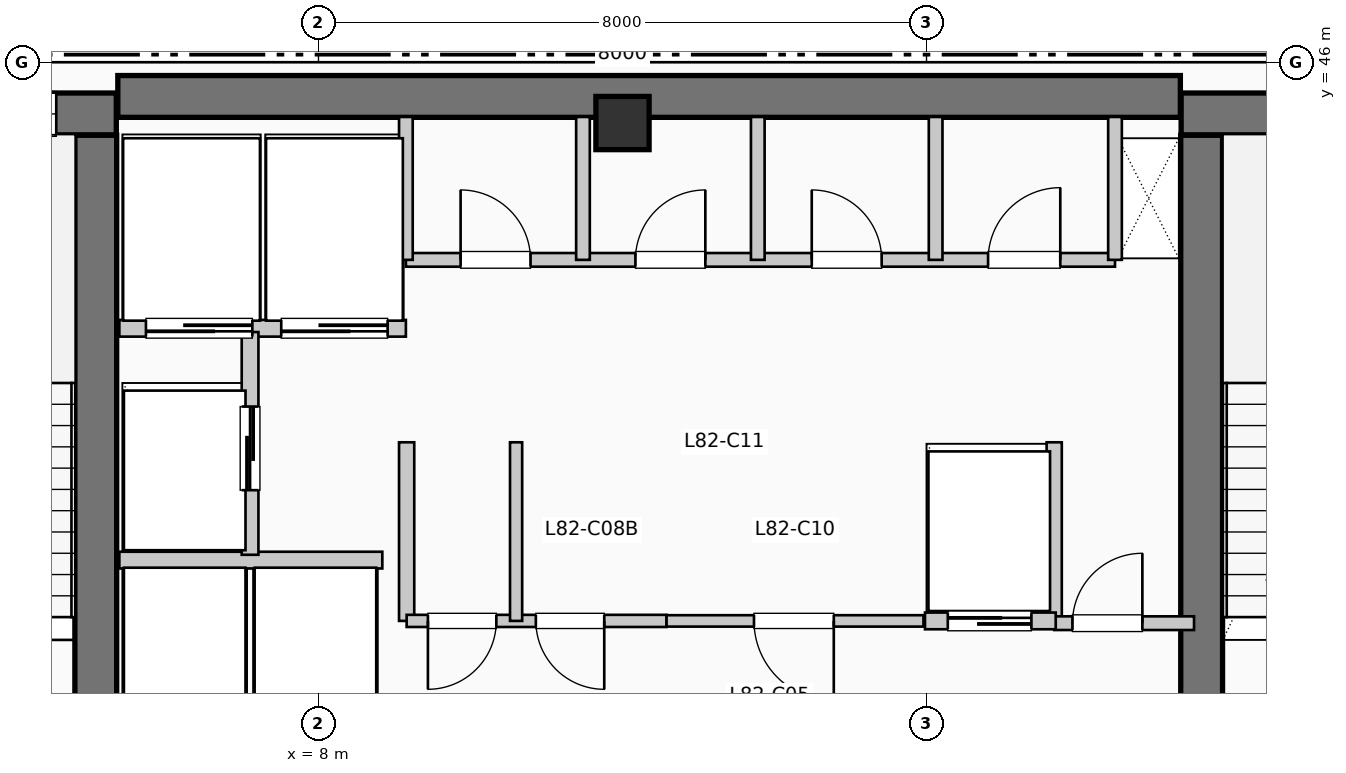
"""IFC4 building model, lengths in metres.
Left out: names, types, materials, properties, quantities, classifications, styles, units other than length and angle.
Written with IfcOpenShell. Run it as: python <this file> out.ifc"""

import sys

from ifc_helpers import new_model, si_unit, direction, frame, frame_2d, origin, origin_2d, place, context, subcontext, project, spatial, rectangle, extrude, element, fill, save


model = new_model("IFC4")
c1 = context("Model", 3, precision=1e-05, world=origin(), true_north=direction((0.0, 1.0)))
c2 = subcontext(c1, "Body", "Model", "MODEL_VIEW")
j1 = project(units=[si_unit("LENGTHUNIT", "METRE"), si_unit("PLANEANGLEUNIT", "RADIAN")], contexts=[c1])
p1 = place(None, origin())
s1 = spatial("IfcSite", under=j1, at=p1, CompositionType="ELEMENT")
p2 = place(p1, origin())
s2 = spatial("IfcBuilding", under=s1, at=p2, CompositionType="ELEMENT")
p3 = place(p2, frame((0.0, 0.0, 335.61)))
s3 = spatial("IfcBuildingStorey", under=s2, at=p3, CompositionType="ELEMENT", Elevation=335.61)
p4 = place(p3, frame((5.36, 45.55, 0.0), z_axis=(0.0, 0.0, 1.0), x_axis=(1.0, 0.0, 0.0)))
e1 = element("IfcWall", 1, at=p4, inside=s3, PredefinedType="SHEAR", context=c2, shape_type="SweptSolid", body=[
    extrude(rectangle(XDim=13.98, YDim=0.55, at=frame_2d((6.99, 0.0))), origin(), (0.0, 0.0, 1.0), 3.96),
])
p5 = place(p3, frame((5.07, 37.15, 0.0), z_axis=(0.0, 0.0, 1.0), x_axis=(0.0, 1.0, 0.0)))
e2 = element("IfcWall", 2, at=p5, inside=s3, PredefinedType="SHEAR", context=c2, shape_type="SweptSolid", body=[
    extrude(rectangle(XDim=7.89, YDim=0.55, at=frame_2d((3.945, 0.0))), origin(), (0.0, 0.0, 1.0), 3.96),
])
p6 = place(p3, frame((1.1, 45.32, 0.0), z_axis=(0.0, 0.0, 1.0), x_axis=(1.0, 0.0, 0.0)))
e3 = element("IfcWall", 3, at=p6, inside=s3, PredefinedType="SHEAR", context=c2, shape_type="SweptSolid", body=[
    extrude(rectangle(XDim=4.24, YDim=0.55, at=frame_2d((2.12, 0.0))), origin(), (0.0, 0.0, 1.0), 3.96),
])
p7 = place(p6, frame((2.05, 0.0, 1.05)))
e4 = element("IfcOpeningElement", 4, at=p7, cuts=e3, PredefinedType="OPENING", context=c2, shape_type="SweptSolid", body=[
    extrude(rectangle(XDim=1.4, YDim=1.8, at=frame_2d((0.7, 0.9))), frame((0.0, 0.285, 0.0), z_axis=(0.0, -1.0, 0.0), x_axis=(1.0, 0.0, 0.0)), (0.0, 0.0, 1.0), 0.57),
])
p8 = place(p3, frame((19.62, 37.15, 0.0), z_axis=(0.0, 0.0, 1.0), x_axis=(0.0, 1.0, 0.0)))
e5 = element("IfcWall", 5, at=p8, inside=s3, PredefinedType="SHEAR", context=c2, shape_type="SweptSolid", body=[
    extrude(rectangle(XDim=7.89, YDim=0.55, at=frame_2d((3.945, 0.0))), origin(), (0.0, 0.0, 1.0), 3.96),
])
p9 = place(p3, frame((19.35, 45.32, 0.0), z_axis=(0.0, 0.0, 1.0), x_axis=(1.0, 0.0, 0.0)))
e6 = element("IfcWall", 6, at=p9, inside=s3, PredefinedType="SHEAR", context=c2, shape_type="SweptSolid", body=[
    extrude(rectangle(XDim=3.69, YDim=0.55, at=frame_2d((1.845, 0.0))), origin(), (0.0, 0.0, 1.0), 3.96),
])
p10 = place(p9, frame((1.15, 0.0, 1.05)))
e7 = element("IfcOpeningElement", 7, at=p10, cuts=e6, PredefinedType="OPENING", context=c2, shape_type="SweptSolid", body=[
    extrude(rectangle(XDim=1.4, YDim=1.8, at=frame_2d((0.7, 0.9))), frame((0.0, 0.285, 0.0), z_axis=(0.0, -1.0, 0.0), x_axis=(1.0, 0.0, 0.0)), (0.0, 0.0, 1.0), 0.57),
])
p11 = place(p3, frame((12.0, 45.2, 0.0), z_axis=(0.0, 0.0, 1.0), x_axis=(1.0, 0.0, 0.0)))
e8 = element("IfcColumn", 8, at=p11, inside=s3, PredefinedType="COLUMN", context=c2, shape_type="SweptSolid", body=[
    extrude(rectangle(XDim=0.7, YDim=0.7, at=origin_2d()), origin(), (0.0, 0.0, 1.0), 3.96),
])
p12 = place(p3, frame((5.38, 39.45, 0.0), z_axis=(0.0, 0.0, 1.0), x_axis=(1.0, 0.0, 0.0)))
e9 = element("IfcWall", 9, at=p12, inside=s3, PredefinedType="PARTITIONING", context=c2, shape_type="SweptSolid", body=[
    extrude(rectangle(XDim=3.46, YDim=0.22, at=frame_2d((1.73, 0.0))), origin(), (0.0, 0.0, 1.0), 3.74),
])
p13 = place(p3, frame((5.38, 42.5, 0.0), z_axis=(0.0, 0.0, 1.0), x_axis=(1.0, 0.0, 0.0)))
e10 = element("IfcWall", 10, at=p13, inside=s3, PredefinedType="PARTITIONING", context=c2, shape_type="SweptSolid", body=[
    extrude(rectangle(XDim=3.77, YDim=0.22, at=frame_2d((1.885, 0.0))), origin(), (0.0, 0.0, 1.0), 3.74),
])
p14 = place(p13, frame((1.75, 0.0, 0.0), z_axis=(0.0, 0.0, 1.0), x_axis=(-1.0, 0.0, 0.0)))
e11 = element("IfcOpeningElement", 11, at=p14, cuts=e10, PredefinedType="OPENING", context=c2, shape_type="SweptSolid", body=[
    extrude(rectangle(XDim=1.4, YDim=2.2, at=frame_2d((0.7, 1.1))), frame((0.0, 0.12, 0.0), z_axis=(0.0, -1.0, 0.0), x_axis=(1.0, 0.0, 0.0)), (0.0, 0.0, 1.0), 0.24),
])
p15 = place(p13, frame((3.53, 0.0, 0.0), z_axis=(0.0, 0.0, 1.0), x_axis=(-1.0, 0.0, 0.0)))
e12 = element("IfcOpeningElement", 12, at=p15, cuts=e10, PredefinedType="OPENING", context=c2, shape_type="SweptSolid", body=[
    extrude(rectangle(XDim=1.4, YDim=2.2, at=frame_2d((0.7, 1.1))), frame((0.0, 0.12, 0.0), z_axis=(0.0, -1.0, 0.0), x_axis=(1.0, 0.0, 0.0)), (0.0, 0.0, 1.0), 0.24),
])
p16 = place(p3, frame((7.1, 39.52, 0.0), z_axis=(0.0, 0.0, 1.0), x_axis=(0.0, 1.0, 0.0)))
e13 = element("IfcWall", 13, at=p16, inside=s3, PredefinedType="PARTITIONING", context=c2, shape_type="SweptSolid", body=[
    extrude(rectangle(XDim=2.93, YDim=0.22, at=frame_2d((1.465, 0.0))), origin(), (0.0, 0.0, 1.0), 3.74),
])
p17 = place(p16, frame((0.85, 0.0, 0.0)))
e14 = element("IfcOpeningElement", 14, at=p17, cuts=e13, PredefinedType="OPENING", context=c2, shape_type="SweptSolid", body=[
    extrude(rectangle(XDim=1.1, YDim=2.2, at=frame_2d((0.55, 1.1))), frame((0.0, 0.12, 0.0), z_axis=(0.0, -1.0, 0.0), x_axis=(1.0, 0.0, 0.0)), (0.0, 0.0, 1.0), 0.24),
])
for number, where, z_axis, x_axis in (
    (15, (9.16, 38.65, 0.0), (0.0, 0.0, 1.0), (0.0, 1.0, 0.0)),
    (16, (17.68, 38.65, 0.0), (0.0, 0.0, 1.0), (0.0, 1.0, 0.0)),
):
    element("IfcWall", number, at=place(p3, frame(where, z_axis=z_axis, x_axis=x_axis)), inside=s3, PredefinedType="PARTITIONING", context=c2, shape_type="SweptSolid", body=[
        extrude(rectangle(XDim=2.35, YDim=0.2, at=frame_2d((1.175, 0.0))), origin(), (0.0, 0.0, 1.0), 3.74),
    ])
p18 = place(p3, frame((17.68, 38.62, 0.0), z_axis=(0.0, 0.0, 1.0), x_axis=(1.0, 0.0, 0.0)))
e17 = element("IfcWall", 17, at=p18, inside=s3, PredefinedType="PARTITIONING", context=c2, shape_type="SweptSolid", body=[
    extrude(rectangle(XDim=1.84, YDim=0.18, at=frame_2d((0.92, 0.0))), origin(), (0.0, 0.0, 1.0), 3.74),
])
p19 = place(p18, frame((0.24, 0.0, 0.0)))
e18 = element("IfcOpeningElement", 18, at=p19, cuts=e17, PredefinedType="OPENING", context=c2, shape_type="SweptSolid", body=[
    extrude(rectangle(XDim=0.92, YDim=2.1, at=frame_2d((0.46, 1.05))), frame((0.0, 0.1, 0.0), z_axis=(0.0, -1.0, 0.0), x_axis=(1.0, 0.0, 0.0)), (0.0, 0.0, 1.0), 0.2),
])
p20 = place(p3, frame((9.16, 38.65, 0.0), z_axis=(0.0, 0.0, 1.0), x_axis=(1.0, 0.0, 0.0)))
e19 = element("IfcWall", 19, at=p20, inside=s3, PredefinedType="PARTITIONING", context=c2, shape_type="SweptSolid", body=[
    extrude(rectangle(XDim=3.42, YDim=0.16, at=frame_2d((1.71, 0.0))), origin(), (0.0, 0.0, 1.0), 3.74),
])
p21 = place(p20, frame((1.18, 0.0, 0.0), z_axis=(0.0, 0.0, 1.0), x_axis=(-1.0, 0.0, 0.0)))
e20 = element("IfcOpeningElement", 20, at=p21, cuts=e19, PredefinedType="OPENING", context=c2, shape_type="SweptSolid", body=[
    extrude(rectangle(XDim=0.9, YDim=2.15, at=frame_2d((0.45, 1.075))), frame((0.0, 0.09, 0.0), z_axis=(0.0, -1.0, 0.0), x_axis=(1.0, 0.0, 0.0)), (0.0, 0.0, 1.0), 0.18),
])
p22 = place(p20, frame((2.6, 0.0, 0.0), z_axis=(0.0, 0.0, 1.0), x_axis=(-1.0, 0.0, 0.0)))
e21 = element("IfcOpeningElement", 21, at=p22, cuts=e19, PredefinedType="OPENING", context=c2, shape_type="SweptSolid", body=[
    extrude(rectangle(XDim=0.9, YDim=2.15, at=frame_2d((0.45, 1.075))), frame((0.0, 0.09, 0.0), z_axis=(0.0, -1.0, 0.0), x_axis=(1.0, 0.0, 0.0)), (0.0, 0.0, 1.0), 0.18),
])
p23 = place(p3, frame((10.6, 38.65, 0.0), z_axis=(0.0, 0.0, 1.0), x_axis=(0.0, 1.0, 0.0)))
e22 = element("IfcWall", 22, at=p23, inside=s3, PredefinedType="PARTITIONING", context=c2, shape_type="SweptSolid", body=[
    extrude(rectangle(XDim=2.35, YDim=0.16, at=frame_2d((1.175, 0.0))), origin(), (0.0, 0.0, 1.0), 3.74),
])
p24 = place(p3, frame((12.58, 38.65, 0.0), z_axis=(0.0, 0.0, 1.0), x_axis=(1.0, 0.0, 0.0)))
e23 = element("IfcWall", 23, at=p24, inside=s3, PredefinedType="PARTITIONING", context=c2, shape_type="SweptSolid", body=[
    extrude(rectangle(XDim=3.38, YDim=0.15, at=frame_2d((1.69, 0.0))), origin(), (0.0, 0.0, 1.0), 3.74),
])
p25 = place(p24, frame((2.2, 0.0, 0.0), z_axis=(0.0, 0.0, 1.0), x_axis=(-1.0, 0.0, 0.0)))
e24 = element("IfcOpeningElement", 24, at=p25, cuts=e23, PredefinedType="OPENING", context=c2, shape_type="SweptSolid", body=[
    extrude(rectangle(XDim=1.05, YDim=2.15, at=frame_2d((0.525, 1.075))), frame((0.0, 0.085, 0.0), z_axis=(0.0, -1.0, 0.0), x_axis=(1.0, 0.0, 0.0)), (0.0, 0.0, 1.0), 0.17),
])
p26 = place(p3, frame((15.98, 38.65, 0.0), z_axis=(0.0, 0.0, 1.0), x_axis=(1.0, 0.0, 0.0)))
e25 = element("IfcWall", 25, at=p26, inside=s3, PredefinedType="PARTITIONING", context=c2, shape_type="SweptSolid", body=[
    extrude(rectangle(XDim=1.72, YDim=0.22, at=frame_2d((0.86, 0.0))), origin(), (0.0, 0.0, 1.0), 3.74),
])
p27 = place(p26, frame((0.3, 0.0, 0.0)))
e26 = element("IfcOpeningElement", 26, at=p27, cuts=e25, PredefinedType="OPENING", context=c2, shape_type="SweptSolid", body=[
    extrude(rectangle(XDim=1.1, YDim=2.2, at=frame_2d((0.55, 1.1))), frame((0.0, 0.12, 0.0), z_axis=(0.0, -1.0, 0.0), x_axis=(1.0, 0.0, 0.0)), (0.0, 0.0, 1.0), 0.24),
])
p28 = place(p3, frame((9.15, 43.4, 0.0), z_axis=(0.0, 0.0, 1.0), x_axis=(1.0, 0.0, 0.0)))
e27 = element("IfcWall", 27, at=p28, inside=s3, PredefinedType="PLUMBINGWALL", context=c2, shape_type="SweptSolid", body=[
    extrude(rectangle(XDim=9.33, YDim=0.18, at=frame_2d((4.665, 0.0))), origin(), (0.0, 0.0, 1.0), 3.74),
])
p29 = place(p28, frame((0.72, 0.0, 0.0)))
e28 = element("IfcOpeningElement", 28, at=p29, cuts=e27, PredefinedType="OPENING", context=c2, shape_type="SweptSolid", body=[
    extrude(rectangle(XDim=0.92, YDim=2.1, at=frame_2d((0.46, 1.05))), frame((0.0, 0.1, 0.0), z_axis=(0.0, -1.0, 0.0), x_axis=(1.0, 0.0, 0.0)), (0.0, 0.0, 1.0), 0.2),
])
p30 = place(p28, frame((3.02, 0.0, 0.0)))
e29 = element("IfcOpeningElement", 29, at=p30, cuts=e27, PredefinedType="OPENING", context=c2, shape_type="SweptSolid", body=[
    extrude(rectangle(XDim=0.92, YDim=2.1, at=frame_2d((0.46, 1.05))), frame((0.0, 0.1, 0.0), z_axis=(0.0, -1.0, 0.0), x_axis=(1.0, 0.0, 0.0)), (0.0, 0.0, 1.0), 0.2),
])
p31 = place(p28, frame((5.34, 0.0, 0.0)))
e30 = element("IfcOpeningElement", 30, at=p31, cuts=e27, PredefinedType="OPENING", context=c2, shape_type="SweptSolid", body=[
    extrude(rectangle(XDim=0.92, YDim=2.1, at=frame_2d((0.46, 1.05))), frame((0.0, 0.1, 0.0), z_axis=(0.0, -1.0, 0.0), x_axis=(1.0, 0.0, 0.0)), (0.0, 0.0, 1.0), 0.2),
])
p32 = place(p28, frame((7.66, 0.0, 0.0)))
e31 = element("IfcOpeningElement", 31, at=p32, cuts=e27, PredefinedType="OPENING", context=c2, shape_type="SweptSolid", body=[
    extrude(rectangle(XDim=0.95, YDim=2.1, at=frame_2d((0.475, 1.05))), frame((0.0, 0.1, 0.0), z_axis=(0.0, -1.0, 0.0), x_axis=(1.0, 0.0, 0.0)), (0.0, 0.0, 1.0), 0.2),
])
for number, where, z_axis, x_axis in (
    (32, (9.15, 43.4, 0.0), (0.0, 0.0, 1.0), (0.0, 1.0, 0.0)),
    (33, (18.48, 43.4, 0.0), (0.0, 0.0, 1.0), (0.0, 1.0, 0.0)),
    (34, (11.48, 43.4, 0.0), (0.0, 0.0, 1.0), (0.0, 1.0, 0.0)),
    (35, (13.78, 43.4, 0.0), (0.0, 0.0, 1.0), (0.0, 1.0, 0.0)),
    (36, (16.12, 43.4, 0.0), (0.0, 0.0, 1.0), (0.0, 1.0, 0.0)),
):
    element("IfcWall", number, at=place(p3, frame(where, z_axis=z_axis, x_axis=x_axis)), inside=s3, PredefinedType="PLUMBINGWALL", context=c2, shape_type="SweptSolid", body=[
        extrude(rectangle(XDim=1.88, YDim=0.18, at=frame_2d((0.94, 0.0))), origin(), (0.0, 0.0, 1.0), 3.74),
    ])
p33 = place(p7, origin())
e37 = element("IfcWindow", 37, at=p33, inside=s3, PartitioningType="SINGLE_PANEL", PredefinedType="WINDOW", context=c2, shape_type="SweptSolid", body=[
    extrude(rectangle(XDim=1.4, YDim=1.8, at=frame_2d((0.7, 0.9))), frame((0.0, 0.03, 0.0), z_axis=(0.0, -1.0, 0.0), x_axis=(1.0, 0.0, 0.0)), (0.0, 0.0, 1.0), 0.06),
])
fill(e4, e37)
p34 = place(p14, origin())
e38 = element("IfcDoor", 38, at=p34, inside=s3, OperationType="SLIDING_TO_LEFT", PredefinedType="DOOR", context=c2, shape_type="SweptSolid", body=[
    extrude(rectangle(XDim=1.4, YDim=2.2, at=frame_2d((0.7, 1.1))), frame((0.0, 0.025, 0.0), z_axis=(0.0, -1.0, 0.0), x_axis=(1.0, 0.0, 0.0)), (0.0, 0.0, 1.0), 0.05),
])
fill(e11, e38)
p35 = place(p15, origin())
e39 = element("IfcDoor", 39, at=p35, inside=s3, OperationType="SLIDING_TO_LEFT", PredefinedType="DOOR", context=c2, shape_type="SweptSolid", body=[
    extrude(rectangle(XDim=1.4, YDim=2.2, at=frame_2d((0.7, 1.1))), frame((0.0, 0.025, 0.0), z_axis=(0.0, -1.0, 0.0), x_axis=(1.0, 0.0, 0.0)), (0.0, 0.0, 1.0), 0.05),
])
fill(e12, e39)
p36 = place(p17, origin())
e40 = element("IfcDoor", 40, at=p36, inside=s3, OperationType="SLIDING_TO_LEFT", PredefinedType="DOOR", context=c2, shape_type="SweptSolid", body=[
    extrude(rectangle(XDim=1.1, YDim=2.2, at=frame_2d((0.55, 1.1))), frame((0.0, 0.025, 0.0), z_axis=(0.0, -1.0, 0.0), x_axis=(1.0, 0.0, 0.0)), (0.0, 0.0, 1.0), 0.05),
])
fill(e14, e40)
p37 = place(p19, origin())
e41 = element("IfcDoor", 41, at=p37, inside=s3, OperationType="SINGLE_SWING_RIGHT", PredefinedType="DOOR", context=c2, shape_type="SweptSolid", body=[
    extrude(rectangle(XDim=0.92, YDim=2.1, at=frame_2d((0.46, 1.05))), frame((0.0, 0.025, 0.0), z_axis=(0.0, -1.0, 0.0), x_axis=(1.0, 0.0, 0.0)), (0.0, 0.0, 1.0), 0.05),
])
fill(e18, e41)
p38 = place(p21, origin())
e42 = element("IfcDoor", 42, at=p38, inside=s3, OperationType="SINGLE_SWING_LEFT", PredefinedType="DOOR", context=c2, shape_type="SweptSolid", body=[
    extrude(rectangle(XDim=0.9, YDim=2.15, at=frame_2d((0.45, 1.075))), frame((0.0, 0.025, 0.0), z_axis=(0.0, -1.0, 0.0), x_axis=(1.0, 0.0, 0.0)), (0.0, 0.0, 1.0), 0.05),
])
fill(e20, e42)
p39 = place(p22, origin())
e43 = element("IfcDoor", 43, at=p39, inside=s3, OperationType="SINGLE_SWING_RIGHT", PredefinedType="DOOR", context=c2, shape_type="SweptSolid", body=[
    extrude(rectangle(XDim=0.9, YDim=2.15, at=frame_2d((0.45, 1.075))), frame((0.0, 0.025, 0.0), z_axis=(0.0, -1.0, 0.0), x_axis=(1.0, 0.0, 0.0)), (0.0, 0.0, 1.0), 0.05),
])
fill(e21, e43)
p40 = place(p25, origin())
e44 = element("IfcDoor", 44, at=p40, inside=s3, OperationType="SINGLE_SWING_RIGHT", PredefinedType="DOOR", context=c2, shape_type="SweptSolid", body=[
    extrude(rectangle(XDim=1.05, YDim=2.15, at=frame_2d((0.525, 1.075))), frame((0.0, 0.025, 0.0), z_axis=(0.0, -1.0, 0.0), x_axis=(1.0, 0.0, 0.0)), (0.0, 0.0, 1.0), 0.05),
])
fill(e24, e44)
p41 = place(p27, origin())
e45 = element("IfcDoor", 45, at=p41, inside=s3, OperationType="SLIDING_TO_LEFT", PredefinedType="DOOR", context=c2, shape_type="SweptSolid", body=[
    extrude(rectangle(XDim=1.1, YDim=2.2, at=frame_2d((0.55, 1.1))), frame((0.0, 0.025, 0.0), z_axis=(0.0, -1.0, 0.0), x_axis=(1.0, 0.0, 0.0)), (0.0, 0.0, 1.0), 0.05),
])
fill(e26, e45)
p42 = place(p29, origin())
e46 = element("IfcDoor", 46, at=p42, inside=s3, OperationType="SINGLE_SWING_LEFT", PredefinedType="DOOR", context=c2, shape_type="SweptSolid", body=[
    extrude(rectangle(XDim=0.92, YDim=2.1, at=frame_2d((0.46, 1.05))), frame((0.0, 0.025, 0.0), z_axis=(0.0, -1.0, 0.0), x_axis=(1.0, 0.0, 0.0)), (0.0, 0.0, 1.0), 0.05),
])
fill(e28, e46)
p43 = place(p30, origin())
e47 = element("IfcDoor", 47, at=p43, inside=s3, OperationType="SINGLE_SWING_RIGHT", PredefinedType="DOOR", context=c2, shape_type="SweptSolid", body=[
    extrude(rectangle(XDim=0.92, YDim=2.1, at=frame_2d((0.46, 1.05))), frame((0.0, 0.025, 0.0), z_axis=(0.0, -1.0, 0.0), x_axis=(1.0, 0.0, 0.0)), (0.0, 0.0, 1.0), 0.05),
])
fill(e29, e47)
p44 = place(p31, origin())
e48 = element("IfcDoor", 48, at=p44, inside=s3, OperationType="SINGLE_SWING_LEFT", PredefinedType="DOOR", context=c2, shape_type="SweptSolid", body=[
    extrude(rectangle(XDim=0.92, YDim=2.1, at=frame_2d((0.46, 1.05))), frame((0.0, 0.025, 0.0), z_axis=(0.0, -1.0, 0.0), x_axis=(1.0, 0.0, 0.0)), (0.0, 0.0, 1.0), 0.05),
])
fill(e30, e48)
p45 = place(p32, origin())
e49 = element("IfcDoor", 49, at=p45, inside=s3, OperationType="SINGLE_SWING_RIGHT", PredefinedType="DOOR", context=c2, shape_type="SweptSolid", body=[
    extrude(rectangle(XDim=0.95, YDim=2.1, at=frame_2d((0.475, 1.05))), frame((0.0, 0.025, 0.0), z_axis=(0.0, -1.0, 0.0), x_axis=(1.0, 0.0, 0.0)), (0.0, 0.0, 1.0), 0.05),
])
fill(e31, e49)
save(model, sys.argv[1])
